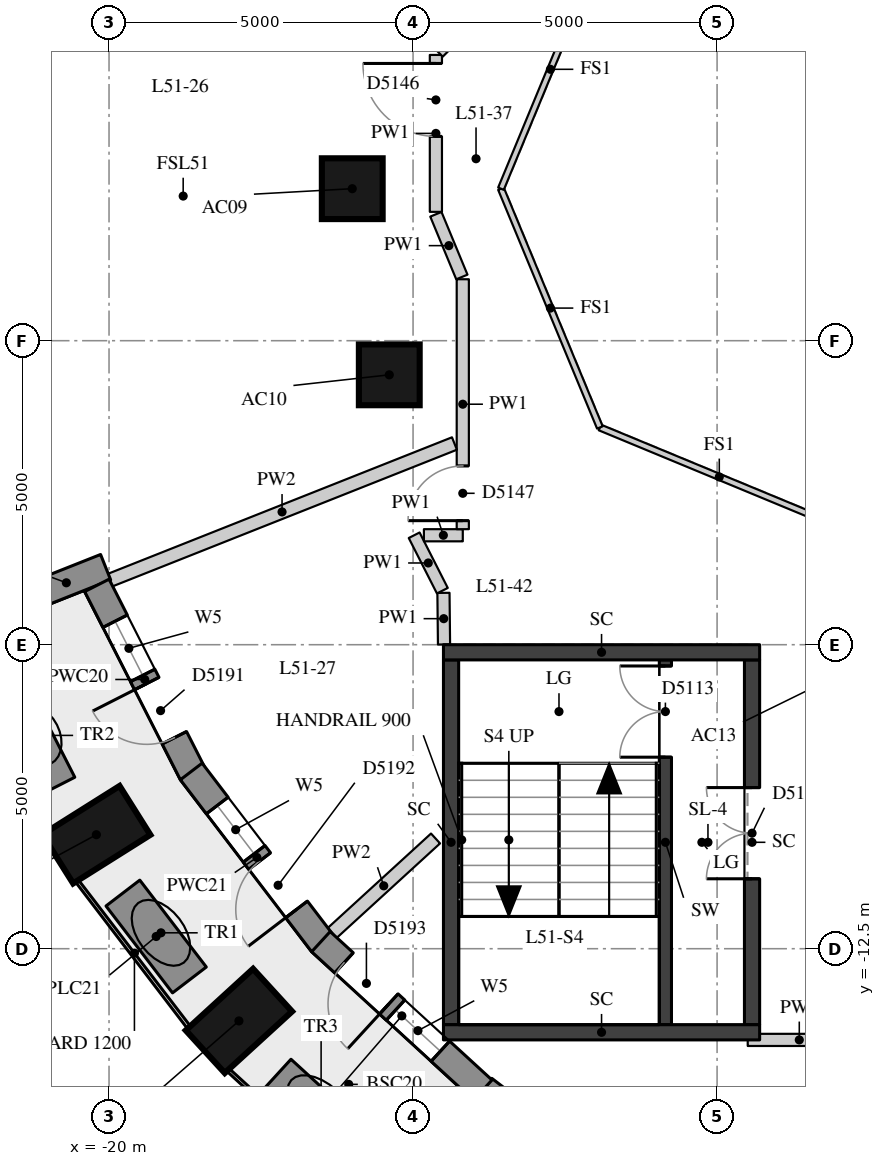
"""IFC4 building model, lengths in metres.
Left out: names, types, materials, properties, quantities, classifications, styles, units other than length and angle.
Written with IfcOpenShell. Run it as: python <this file> out.ifc"""

import sys

from ifc_helpers import new_model, si_unit, direction, frame, frame_2d, origin, origin_2d, place, context, subcontext, project, spatial, rectangle, extrude, element, fill, save


model = new_model("IFC4")
c1 = context("Model", 3, precision=1e-05, world=origin(), true_north=direction((0.0, 1.0)))
c2 = subcontext(c1, "Body", "Model", "MODEL_VIEW")
j1 = project(units=[si_unit("LENGTHUNIT", "METRE"), si_unit("PLANEANGLEUNIT", "RADIAN")], contexts=[c1])
p1 = place(None, origin())
s1 = spatial("IfcSite", under=j1, at=p1, CompositionType="ELEMENT")
p2 = place(p1, origin())
s2 = spatial("IfcBuilding", under=s1, at=p2, CompositionType="ELEMENT")
p3 = place(p2, frame((0.0, 0.0, 181.4)))
s3 = spatial("IfcBuildingStorey", under=s2, at=p3, CompositionType="ELEMENT", Elevation=181.4)
for number, where, z_axis, x_axis in (
    (1, (-20.208, -10.625, 0.0), (0.0, 0.0, 1.0), (-0.846, -0.533, 0.0)),
    (2, (-17.864, -13.688, 0.0), (0.0, 0.0, 1.0), (-0.738, -0.675, 0.0)),
):
    element("IfcColumn", number, at=place(p3, frame(where, z_axis=z_axis, x_axis=x_axis)), inside=s3, PredefinedType="COLUMN", context=c2, shape_type="SweptSolid", body=[
        extrude(rectangle(XDim=1.5, YDim=0.95, at=origin_2d()), origin(), (0.0, 0.0, 1.0), 3.3),
    ])
for number, where, z_axis, x_axis in (
    (3, (-16.0, 0.0, 0.0), (0.0, 0.0, 1.0), (1.0, 0.0, 0.0)),
    (4, (-15.391, -3.062, 0.0), (0.0, 0.0, 1.0), (1.0, 0.0, 0.0)),
):
    element("IfcColumn", number, at=place(p3, frame(where, z_axis=z_axis, x_axis=x_axis)), inside=s3, PredefinedType="COLUMN", context=c2, shape_type="SweptSolid", body=[
        extrude(rectangle(XDim=1.0, YDim=1.0, at=origin_2d()), origin(), (0.0, 0.0, 1.0), 3.3),
    ])
p4 = place(p3, frame((-21.348, -6.738, 0.0), z_axis=(0.0, 0.0, 1.0), x_axis=(0.929514600716, 0.368785312961, 0.0)))
e5 = element("IfcWall", 5, at=p4, inside=s3, PredefinedType="SOLIDWALL", context=c2, shape_type="SweptSolid", body=[
    extrude(rectangle(XDim=1.39, YDim=0.45, at=frame_2d((0.695, 0.0))), origin(), (0.0, 0.0, 1.0), 2.85),
])
p5 = place(p3, frame((-14.375, -15.871, 0.0), z_axis=(0.0, 0.0, 1.0), x_axis=(0.609982261713, 0.792415068253, 0.0)))
e6 = element("IfcWall", 6, at=p5, inside=s3, PredefinedType="SOLIDWALL", context=c2, shape_type="SweptSolid", body=[
    extrude(rectangle(XDim=1.39, YDim=0.45, at=frame_2d((0.695, 0.0))), origin(), (0.0, 0.0, 1.0), 2.4),
])
p6 = place(p3, frame((-20.2, -6.524, 0.0), z_axis=(0.0, 0.0, 1.0), x_axis=(0.453222057065, -0.891397648073, 0.0)))
e7 = element("IfcWall", 7, at=p6, inside=s3, PredefinedType="SOLIDWALL", context=c2, shape_type="SweptSolid", body=[
    extrude(rectangle(XDim=3.472, YDim=0.45, at=frame_2d((1.736, 0.0))), origin(), (0.0, 0.0, 1.0), 2.85),
])
p7 = place(p6, frame((0.661, 0.0, 0.4)))
e8 = element("IfcOpeningElement", 8, at=p7, cuts=e7, PredefinedType="OPENING", context=c2, shape_type="SweptSolid", body=[
    extrude(rectangle(XDim=1.0, YDim=1.75, at=frame_2d((0.5, 0.875))), frame((0.0, 0.235, 0.0), z_axis=(0.0, -1.0, 0.0), x_axis=(1.0, 0.0, 0.0)), (0.0, 0.0, 1.0), 0.47),
])
p8 = place(p6, frame((1.811, 0.0, 0.0)))
e9 = element("IfcOpeningElement", 9, at=p8, cuts=e7, PredefinedType="OPENING", context=c2, shape_type="SweptSolid", body=[
    extrude(rectangle(XDim=1.0, YDim=2.15, at=frame_2d((0.5, 1.075))), frame((0.0, 0.235, 0.0), z_axis=(0.0, -1.0, 0.0), x_axis=(1.0, 0.0, 0.0)), (0.0, 0.0, 1.0), 0.47),
])
p9 = place(p3, frame((-18.648, -9.585, 0.0), z_axis=(0.0, 0.0, 1.0), x_axis=(0.606795400684, -0.794858063876, 0.0)))
e10 = element("IfcWall", 10, at=p9, inside=s3, PredefinedType="SOLIDWALL", context=c2, shape_type="SweptSolid", body=[
    extrude(rectangle(XDim=3.558, YDim=0.45, at=frame_2d((1.779, 0.0))), origin(), (0.0, 0.0, 1.0), 2.85),
])
p10 = place(p9, frame((0.704, 0.0, 0.4)))
e11 = element("IfcOpeningElement", 11, at=p10, cuts=e10, PredefinedType="OPENING", context=c2, shape_type="SweptSolid", body=[
    extrude(rectangle(XDim=1.0, YDim=1.75, at=frame_2d((0.5, 0.875))), frame((0.0, 0.235, 0.0), z_axis=(0.0, -1.0, 0.0), x_axis=(1.0, 0.0, 0.0)), (0.0, 0.0, 1.0), 0.47),
])
p11 = place(p9, frame((1.854, 0.0, 0.0)))
e12 = element("IfcOpeningElement", 12, at=p11, cuts=e10, PredefinedType="OPENING", context=c2, shape_type="SweptSolid", body=[
    extrude(rectangle(XDim=1.0, YDim=2.15, at=frame_2d((0.5, 1.075))), frame((0.0, 0.235, 0.0), z_axis=(0.0, -1.0, 0.0), x_axis=(1.0, 0.0, 0.0)), (0.0, 0.0, 1.0), 0.47),
])
p12 = place(p3, frame((-16.515, -12.384, 0.0), z_axis=(0.0, 0.0, 1.0), x_axis=(0.736968915604, -0.675926636133, 0.0)))
e13 = element("IfcWall", 13, at=p12, inside=s3, PredefinedType="SOLIDWALL", context=c2, shape_type="SweptSolid", body=[
    extrude(rectangle(XDim=3.612, YDim=0.45, at=frame_2d((1.806, 0.0))), origin(), (0.0, 0.0, 1.0), 2.85),
])
p13 = place(p12, frame((1.665, 0.0, 0.4)))
e14 = element("IfcOpeningElement", 14, at=p13, cuts=e13, PredefinedType="OPENING", context=c2, shape_type="SweptSolid", body=[
    extrude(rectangle(XDim=1.0, YDim=1.75, at=frame_2d((0.5, 0.875))), frame((0.0, 0.235, 0.0), z_axis=(0.0, -1.0, 0.0), x_axis=(1.0, 0.0, 0.0)), (0.0, 0.0, 1.0), 0.47),
])
p14 = place(p12, frame((0.515, 0.0, 0.0)))
e15 = element("IfcOpeningElement", 15, at=p14, cuts=e13, PredefinedType="OPENING", context=c2, shape_type="SweptSolid", body=[
    extrude(rectangle(XDim=1.0, YDim=2.15, at=frame_2d((0.5, 1.075))), frame((0.0, 0.235, 0.0), z_axis=(0.0, -1.0, 0.0), x_axis=(1.0, 0.0, 0.0)), (0.0, 0.0, 1.0), 0.47),
])
for number, where, z_axis, x_axis in (
    (16, (-21.692, -8.235, 0.0), (0.0, 0.0, 1.0), (0.454, -0.891, 0.0)),
    (17, (-19.772, -11.585, 0.0), (0.0, 0.0, 1.0), (0.608, -0.794, 0.0)),
    (18, (-17.244, -14.576, 0.0), (0.0, 0.0, 1.0), (0.738, -0.675, 0.0)),
):
    element("IfcWall", number, at=place(p3, frame(where, z_axis=z_axis, x_axis=x_axis)), inside=s3, PredefinedType="USERDEFINED", context=c2, shape_type="SweptSolid", body=[
        extrude(rectangle(XDim=1.8, YDim=0.7, at=frame_2d((0.9, 0.0))), origin(), (0.0, 0.0, 1.0), 0.75),
    ])
p15 = place(p3, frame((-10.85, -13.75, 0.0), z_axis=(0.0, 0.0, 1.0), x_axis=(0.0, 1.0, 0.0)))
e19 = element("IfcWall", 19, at=p15, inside=s3, PredefinedType="SHEAR", context=c2, shape_type="SweptSolid", body=[
    extrude(rectangle(XDim=6.0, YDim=0.2, at=frame_2d((3.0, 0.0))), origin(), (0.0, 0.0, 1.0), 2.85),
])
p16 = place(p15, frame((4.4, 0.0, 0.0)))
e20 = element("IfcOpeningElement", 20, at=p16, cuts=e19, PredefinedType="OPENING", context=c2, shape_type="SweptSolid", body=[
    extrude(rectangle(XDim=1.5, YDim=2.1, at=frame_2d((0.75, 1.05))), frame((0.0, 0.11, 0.0), z_axis=(0.0, -1.0, 0.0), x_axis=(1.0, 0.0, 0.0)), (0.0, 0.0, 1.0), 0.22),
])
p17 = place(p3, frame((-14.375, -13.75, -0.28), z_axis=(0.0, 0.0, 1.0), x_axis=(0.0, 1.0, 0.0)))
e21 = element("IfcWall", 21, at=p17, inside=s3, PredefinedType="SHEAR", context=c2, shape_type="SweptSolid", body=[
    extrude(rectangle(XDim=6.0, YDim=0.25, at=frame_2d((3.0, 0.0))), origin(), (0.0, 0.0, 1.0), 3.13),
])
p18 = place(p3, frame((-9.425, -13.75, -0.28), z_axis=(0.0, 0.0, 1.0), x_axis=(0.0, 1.0, 0.0)))
e22 = element("IfcWall", 22, at=p18, inside=s3, PredefinedType="SHEAR", context=c2, shape_type="SweptSolid", body=[
    extrude(rectangle(XDim=6.0, YDim=0.25, at=frame_2d((3.0, 0.0))), origin(), (0.0, 0.0, 1.0), 3.13),
])
p19 = place(p18, frame((2.4, 0.0, 0.28)))
e23 = element("IfcOpeningElement", 23, at=p19, cuts=e22, PredefinedType="OPENING", context=c2, shape_type="SweptSolid", body=[
    extrude(rectangle(XDim=1.5, YDim=2.1, at=frame_2d((0.75, 1.05))), frame((0.0, 0.135, 0.0), z_axis=(0.0, -1.0, 0.0), x_axis=(1.0, 0.0, 0.0)), (0.0, 0.0, 1.0), 0.27),
])
for number, where, z_axis, x_axis in (
    (24, (-14.5, -7.625, -0.28), (0.0, 0.0, 1.0), (1.0, 0.0, 0.0)),
    (25, (-14.5, -13.875, -0.28), (0.0, 0.0, 1.0), (1.0, 0.0, 0.0)),
):
    element("IfcWall", number, at=place(p3, frame(where, z_axis=z_axis, x_axis=x_axis)), inside=s3, PredefinedType="SHEAR", context=c2, shape_type="SweptSolid", body=[
        extrude(rectangle(XDim=5.2, YDim=0.25, at=frame_2d((2.6, 0.0))), origin(), (0.0, 0.0, 1.0), 3.13),
    ])
p20 = place(p3, frame((-7.8, -14.0, 0.0), z_axis=(0.0, 0.0, 1.0), x_axis=(-1.0, 0.0, 0.0)))
e26 = element("IfcWall", 26, at=p20, inside=s3, PredefinedType="PARTITIONING", context=c2, shape_type="SweptSolid", body=[
    extrude(rectangle(XDim=1.696, YDim=0.2, at=frame_2d((0.848, 0.0))), origin(), (0.0, 0.0, 1.0), 2.85),
])
p21 = place(p3, frame((-14.491, -7.496, 0.0), z_axis=(0.0, 0.0, 1.0), x_axis=(-0.010931452674, 0.999940249886, 0.0)))
e27 = element("IfcWall", 27, at=p21, inside=s3, PredefinedType="PARTITIONING", context=c2, shape_type="SweptSolid", body=[
    extrude(rectangle(XDim=0.849, YDim=0.2, at=frame_2d((0.424, 0.0))), origin(), (0.0, 0.0, 1.0), 2.85),
])
p22 = place(p3, frame((-14.518, -6.612, 0.0), z_axis=(0.0, 0.0, 1.0), x_axis=(-0.45321774915, 0.891399838375, 0.0)))
e28 = element("IfcWall", 28, at=p22, inside=s3, PredefinedType="PARTITIONING", context=c2, shape_type="SweptSolid", body=[
    extrude(rectangle(XDim=1.023, YDim=0.2, at=frame_2d((0.511, 0.0))), origin(), (0.0, 0.0, 1.0), 2.85),
])
p23 = place(p3, frame((-14.822, -5.7, 0.0), z_axis=(0.0, 0.0, 1.0), x_axis=(1.0, 0.0, 0.0)))
e29 = element("IfcWall", 29, at=p23, inside=s3, PredefinedType="PARTITIONING", context=c2, shape_type="SweptSolid", body=[
    extrude(rectangle(XDim=0.639, YDim=0.2, at=frame_2d((0.32, 0.0))), origin(), (0.0, 0.0, 1.0), 2.85),
])
p24 = place(p3, frame((-14.182, -5.6, 0.0), z_axis=(0.0, 0.0, 1.0), x_axis=(0.0, 1.0, 0.0)))
e30 = element("IfcWall", 30, at=p24, inside=s3, PredefinedType="PARTITIONING", context=c2, shape_type="SweptSolid", body=[
    extrude(rectangle(XDim=4.111, YDim=0.2, at=frame_2d((2.055, 0.0))), origin(), (0.0, 0.0, 1.0), 2.85),
])
p25 = place(p24, frame((0.14, 0.0, 0.0)))
e31 = element("IfcOpeningElement", 31, at=p25, cuts=e30, PredefinedType="OPENING", context=c2, shape_type="SweptSolid", body=[
    extrude(rectangle(XDim=0.9, YDim=2.1, at=frame_2d((0.45, 1.05))), frame((0.0, 0.11, 0.0), z_axis=(0.0, -1.0, 0.0), x_axis=(1.0, 0.0, 0.0)), (0.0, 0.0, 1.0), 0.22),
])
p26 = place(p3, frame((-14.197, -1.452, 0.0), z_axis=(0.0, 0.0, 1.0), x_axis=(-0.382750994913, 0.923851544293, 0.0)))
e32 = element("IfcWall", 32, at=p26, inside=s3, PredefinedType="PARTITIONING", context=c2, shape_type="SweptSolid", body=[
    extrude(rectangle(XDim=1.116, YDim=0.2, at=frame_2d((0.558, 0.0))), origin(), (0.0, 0.0, 1.0), 2.85),
])
p27 = place(p3, frame((-14.625, -0.381, 0.0), z_axis=(0.0, 0.0, 1.0), x_axis=(0.0, 1.0, 0.0)))
e33 = element("IfcWall", 33, at=p27, inside=s3, PredefinedType="PARTITIONING", context=c2, shape_type="SweptSolid", body=[
    extrude(rectangle(XDim=2.581, YDim=0.2, at=frame_2d((1.291, 0.0))), origin(), (0.0, 0.0, 1.0), 2.85),
])
p28 = place(p27, frame((1.241, 0.0, 0.0)))
e34 = element("IfcOpeningElement", 34, at=p28, cuts=e33, PredefinedType="OPENING", context=c2, shape_type="SweptSolid", body=[
    extrude(rectangle(XDim=1.2, YDim=2.1, at=frame_2d((0.6, 1.05))), frame((0.0, 0.11, 0.0), z_axis=(0.0, -1.0, 0.0), x_axis=(1.0, 0.0, 0.0)), (0.0, 0.0, 1.0), 0.22),
])
p29 = place(p3, frame((-14.582, 2.242, 0.0), z_axis=(0.0, 0.0, 1.0), x_axis=(0.706890969579, 0.707322526948, 0.0)))
e35 = element("IfcWall", 35, at=p29, inside=s3, PredefinedType="PARTITIONING", context=c2, shape_type="SweptSolid", body=[
    extrude(rectangle(XDim=0.566, YDim=0.2, at=frame_2d((0.283, 0.0))), origin(), (0.0, 0.0, 1.0), 2.85),
])
p30 = place(p3, frame((-19.99, -6.441, 0.0), z_axis=(0.0, 0.0, 1.0), x_axis=(0.929499857769, 0.368822470042, 0.0)))
e36 = element("IfcWall", 36, at=p30, inside=s3, PredefinedType="PARTITIONING", context=c2, shape_type="SweptSolid", body=[
    extrude(rectangle(XDim=6.101, YDim=0.22, at=frame_2d((3.05, 0.0))), origin(), (0.0, 0.0, 1.0), 2.85),
])
p31 = place(p3, frame((-16.334, -12.245, 0.0), z_axis=(0.0, 0.0, 1.0), x_axis=(0.737917457379, 0.674890973487, 0.0)))
e37 = element("IfcWall", 37, at=p31, inside=s3, PredefinedType="PARTITIONING", context=c2, shape_type="SweptSolid", body=[
    extrude(rectangle(XDim=2.309, YDim=0.22, at=frame_2d((1.154, 0.0))), origin(), (0.0, 0.0, 1.0), 2.85),
])
for number, where, z_axis, x_axis in (
    (38, (-8.0, -5.554, 0.0), (0.0, 0.0, 1.0), (-0.924, 0.383, 0.0)),
    (39, (-11.927, -3.927, 0.0), (0.0, 0.0, 1.0), (-0.383, 0.924, 0.0)),
    (40, (-13.554, 0.0, 0.0), (0.0, 0.0, 1.0), (0.383, 0.924, 0.0)),
):
    element("IfcWall", number, at=place(p3, frame(where, z_axis=z_axis, x_axis=x_axis)), inside=s3, PredefinedType="PARTITIONING", context=c2, shape_type="SweptSolid", body=[
        extrude(rectangle(XDim=4.251, YDim=0.1, at=frame_2d((2.125, 0.0))), origin(), (0.0, 0.0, 1.0), 2.85),
    ])
p32 = place(p7, origin())
e41 = element("IfcWindow", 41, at=p32, inside=s3, PartitioningType="SINGLE_PANEL", PredefinedType="WINDOW", context=c2, shape_type="SweptSolid", body=[
    extrude(rectangle(XDim=1.0, YDim=1.75, at=frame_2d((0.5, 0.875))), frame((0.0, 0.035, 0.0), z_axis=(0.0, -1.0, 0.0), x_axis=(1.0, 0.0, 0.0)), (0.0, 0.0, 1.0), 0.06),
])
fill(e8, e41)
p33 = place(p8, frame((1.0, 0.0, 0.0), z_axis=(0.0, 0.0, 1.0), x_axis=(-1.0, 0.0, 0.0)))
e42 = element("IfcDoor", 42, at=p33, inside=s3, OperationType="SINGLE_SWING_RIGHT", PredefinedType="DOOR", context=c2, shape_type="SweptSolid", body=[
    extrude(rectangle(XDim=1.0, YDim=2.15, at=frame_2d((0.5, 1.075))), frame((0.0, 0.075, 0.0), z_axis=(0.0, -1.0, 0.0), x_axis=(1.0, 0.0, 0.0)), (0.0, 0.0, 1.0), 0.05),
])
fill(e9, e42)
p34 = place(p10, origin())
e43 = element("IfcWindow", 43, at=p34, inside=s3, PartitioningType="SINGLE_PANEL", PredefinedType="WINDOW", context=c2, shape_type="SweptSolid", body=[
    extrude(rectangle(XDim=1.0, YDim=1.75, at=frame_2d((0.5, 0.875))), frame((0.0, 0.035, 0.0), z_axis=(0.0, -1.0, 0.0), x_axis=(1.0, 0.0, 0.0)), (0.0, 0.0, 1.0), 0.06),
])
fill(e11, e43)
p35 = place(p11, frame((1.0, 0.0, 0.0), z_axis=(0.0, 0.0, 1.0), x_axis=(-1.0, 0.0, 0.0)))
e44 = element("IfcDoor", 44, at=p35, inside=s3, OperationType="SINGLE_SWING_LEFT", PredefinedType="DOOR", context=c2, shape_type="SweptSolid", body=[
    extrude(rectangle(XDim=1.0, YDim=2.15, at=frame_2d((0.5, 1.075))), frame((0.0, 0.075, 0.0), z_axis=(0.0, -1.0, 0.0), x_axis=(1.0, 0.0, 0.0)), (0.0, 0.0, 1.0), 0.05),
])
fill(e12, e44)
p36 = place(p13, origin())
e45 = element("IfcWindow", 45, at=p36, inside=s3, PartitioningType="SINGLE_PANEL", PredefinedType="WINDOW", context=c2, shape_type="SweptSolid", body=[
    extrude(rectangle(XDim=1.0, YDim=1.75, at=frame_2d((0.5, 0.875))), frame((0.0, 0.035, 0.0), z_axis=(0.0, -1.0, 0.0), x_axis=(1.0, 0.0, 0.0)), (0.0, 0.0, 1.0), 0.06),
])
fill(e14, e45)
p37 = place(p14, origin())
e46 = element("IfcDoor", 46, at=p37, inside=s3, OperationType="SINGLE_SWING_LEFT", PredefinedType="DOOR", context=c2, shape_type="SweptSolid", body=[
    extrude(rectangle(XDim=1.0, YDim=2.15, at=frame_2d((0.5, 1.075))), frame((0.0, -0.025, 0.0), z_axis=(0.0, -1.0, 0.0), x_axis=(1.0, 0.0, 0.0)), (0.0, 0.0, 1.0), 0.05),
])
fill(e15, e46)
p38 = place(p16, origin())
e47 = element("IfcDoor", 47, at=p38, inside=s3, OperationType="DOUBLE_DOOR_SINGLE_SWING", PredefinedType="DOOR", context=c2, shape_type="SweptSolid", body=[
    extrude(rectangle(XDim=1.5, YDim=2.1, at=frame_2d((0.75, 1.05))), frame((0.0, 0.025, 0.0), z_axis=(0.0, -1.0, 0.0), x_axis=(1.0, 0.0, 0.0)), (0.0, 0.0, 1.0), 0.05),
])
fill(e20, e47)
p39 = place(p19, origin())
e48 = element("IfcDoor", 48, at=p39, inside=s3, OperationType="DOUBLE_DOOR_SINGLE_SWING", PredefinedType="DOOR", context=c2, shape_type="SweptSolid", body=[
    extrude(rectangle(XDim=1.5, YDim=2.1, at=frame_2d((0.75, 1.05))), frame((0.0, 0.025, 0.0), z_axis=(0.0, -1.0, 0.0), x_axis=(1.0, 0.0, 0.0)), (0.0, 0.0, 1.0), 0.05),
])
fill(e23, e48)
p40 = place(p28, origin())
e49 = element("IfcDoor", 49, at=p40, inside=s3, OperationType="SINGLE_SWING_RIGHT", PredefinedType="DOOR", context=c2, shape_type="SweptSolid", body=[
    extrude(rectangle(XDim=1.2, YDim=2.1, at=frame_2d((0.6, 1.05))), frame((0.0, 0.025, 0.0), z_axis=(0.0, -1.0, 0.0), x_axis=(1.0, 0.0, 0.0)), (0.0, 0.0, 1.0), 0.05),
])
fill(e34, e49)
p41 = place(p25, origin())
e50 = element("IfcDoor", 50, at=p41, inside=s3, OperationType="SINGLE_SWING_LEFT", PredefinedType="DOOR", context=c2, shape_type="SweptSolid", body=[
    extrude(rectangle(XDim=0.9, YDim=2.1, at=frame_2d((0.45, 1.05))), frame((0.0, 0.025, 0.0), z_axis=(0.0, -1.0, 0.0), x_axis=(1.0, 0.0, 0.0)), (0.0, 0.0, 1.0), 0.05),
])
fill(e31, e50)
save(model, sys.argv[1])
